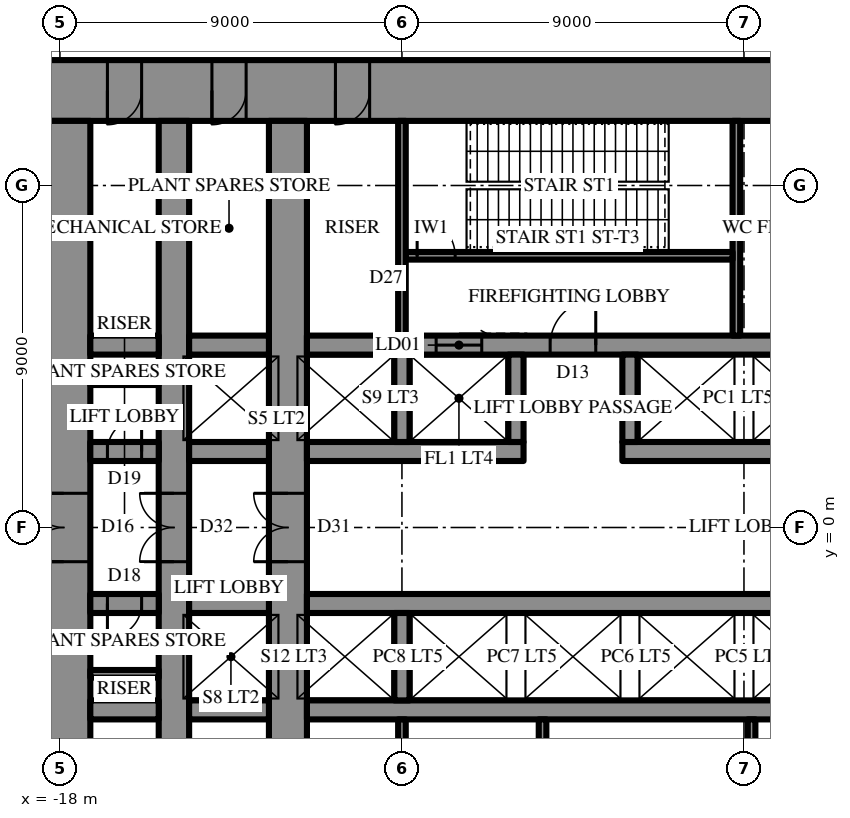
"""IFC4 building model, lengths in metres.
Left out: names, types, materials, properties, quantities, classifications, styles, units other than length and angle.
Written with IfcOpenShell. Run it as: python <this file> out.ifc"""

import sys

from ifc_helpers import new_model, si_unit, direction, frame, frame_2d, origin, place, context, subcontext, project, spatial, rectangle, extrude, element, fill, save


model = new_model("IFC4")
c1 = context("Model", 3, precision=1e-05, world=origin(), true_north=direction((0.0, 1.0)))
c2 = subcontext(c1, "Body", "Model", "MODEL_VIEW")
j1 = project(units=[si_unit("LENGTHUNIT", "METRE"), si_unit("PLANEANGLEUNIT", "RADIAN")], contexts=[c1])
p1 = place(None, origin())
s1 = spatial("IfcSite", under=j1, at=p1, CompositionType="ELEMENT")
p2 = place(p1, origin())
s2 = spatial("IfcBuilding", under=s1, at=p2, CompositionType="ELEMENT")
p3 = place(p2, frame((0.0, 0.0, 203.5)))
s3 = spatial("IfcBuildingStorey", under=s2, at=p3, CompositionType="ELEMENT", Elevation=203.5)
p4 = place(p3, frame((-18.6, 11.5, 0.0), z_axis=(0.0, 0.0, 1.0), x_axis=(1.0, 0.0, 0.0)))
e1 = element("IfcWall", 1, at=p4, inside=s3, PredefinedType="SHEAR", context=c2, shape_type="SweptSolid", body=[
    extrude(rectangle(XDim=37.2, YDim=1.6, at=frame_2d((18.6, 0.0))), origin(), (0.0, 0.0, 1.0), 7.0),
])
p5 = place(p4, frame((19.45, 0.0, 0.0)))
e2 = element("IfcOpeningElement", 2, at=p5, cuts=e1, PredefinedType="OPENING", context=c2, shape_type="SweptSolid", body=[
    extrude(rectangle(XDim=0.9, YDim=2.2, at=frame_2d((0.45, 1.1))), frame((0.0, 0.81, 0.0), z_axis=(0.0, -1.0, 0.0), x_axis=(1.0, 0.0, 0.0)), (0.0, 0.0, 1.0), 1.62),
])
p6 = place(p4, frame((22.45, 0.0, 0.0)))
e3 = element("IfcOpeningElement", 3, at=p6, cuts=e1, PredefinedType="OPENING", context=c2, shape_type="SweptSolid", body=[
    extrude(rectangle(XDim=0.9, YDim=2.2, at=frame_2d((0.45, 1.1))), frame((0.0, 0.81, 0.0), z_axis=(0.0, -1.0, 0.0), x_axis=(1.0, 0.0, 0.0)), (0.0, 0.0, 1.0), 1.62),
])
p7 = place(p4, frame((25.5, 0.0, 0.0)))
e4 = element("IfcOpeningElement", 4, at=p7, cuts=e1, PredefinedType="OPENING", context=c2, shape_type="SweptSolid", body=[
    extrude(rectangle(XDim=1.0, YDim=2.2, at=frame_2d((0.5, 1.1))), frame((0.0, 0.81, 0.0), z_axis=(0.0, -1.0, 0.0), x_axis=(1.0, 0.0, 0.0)), (0.0, 0.0, 1.0), 1.62),
])
p8 = place(p4, frame((1.85, 0.0, 0.0)))
e5 = element("IfcOpeningElement", 5, at=p8, cuts=e1, PredefinedType="OPENING", context=c2, shape_type="SweptSolid", body=[
    extrude(rectangle(XDim=0.9, YDim=2.2, at=frame_2d((0.45, 1.1))), frame((0.0, 0.81, 0.0), z_axis=(0.0, -1.0, 0.0), x_axis=(1.0, 0.0, 0.0)), (0.0, 0.0, 1.0), 1.62),
])
p9 = place(p4, frame((4.6, 0.0, 0.0)))
e6 = element("IfcOpeningElement", 6, at=p9, cuts=e1, PredefinedType="OPENING", context=c2, shape_type="SweptSolid", body=[
    extrude(rectangle(XDim=0.9, YDim=2.2, at=frame_2d((0.45, 1.1))), frame((0.0, 0.81, 0.0), z_axis=(0.0, -1.0, 0.0), x_axis=(1.0, 0.0, 0.0)), (0.0, 0.0, 1.0), 1.62),
])
p10 = place(p4, frame((7.85, 0.0, 0.0)))
e7 = element("IfcOpeningElement", 7, at=p10, cuts=e1, PredefinedType="OPENING", context=c2, shape_type="SweptSolid", body=[
    extrude(rectangle(XDim=0.9, YDim=2.2, at=frame_2d((0.45, 1.1))), frame((0.0, 0.81, 0.0), z_axis=(0.0, -1.0, 0.0), x_axis=(1.0, 0.0, 0.0)), (0.0, 0.0, 1.0), 1.62),
])
p11 = place(p4, frame((28.45, 0.0, 0.0)))
e8 = element("IfcOpeningElement", 8, at=p11, cuts=e1, PredefinedType="OPENING", context=c2, shape_type="SweptSolid", body=[
    extrude(rectangle(XDim=0.9, YDim=2.2, at=frame_2d((0.45, 1.1))), frame((0.0, 0.81, 0.0), z_axis=(0.0, -1.0, 0.0), x_axis=(1.0, 0.0, 0.0)), (0.0, 0.0, 1.0), 1.62),
])
p12 = place(p4, frame((31.7, 0.0, 0.0)))
e9 = element("IfcOpeningElement", 9, at=p12, cuts=e1, PredefinedType="OPENING", context=c2, shape_type="SweptSolid", body=[
    extrude(rectangle(XDim=0.9, YDim=2.2, at=frame_2d((0.45, 1.1))), frame((0.0, 0.81, 0.0), z_axis=(0.0, -1.0, 0.0), x_axis=(1.0, 0.0, 0.0)), (0.0, 0.0, 1.0), 1.62),
])
p13 = place(p4, frame((34.45, 0.0, 0.0)))
e10 = element("IfcOpeningElement", 10, at=p13, cuts=e1, PredefinedType="OPENING", context=c2, shape_type="SweptSolid", body=[
    extrude(rectangle(XDim=0.9, YDim=2.2, at=frame_2d((0.45, 1.1))), frame((0.0, 0.81, 0.0), z_axis=(0.0, -1.0, 0.0), x_axis=(1.0, 0.0, 0.0)), (0.0, 0.0, 1.0), 1.62),
])
p14 = place(p3, frame((-17.9, 10.7, 0.0), z_axis=(0.0, 0.0, 1.0), x_axis=(0.0, -1.0, 0.0)))
e11 = element("IfcWall", 11, at=p14, inside=s3, PredefinedType="SHEAR", context=c2, shape_type="SweptSolid", body=[
    extrude(rectangle(XDim=21.4, YDim=1.4, at=frame_2d((10.7, 0.0))), origin(), (0.0, 0.0, 1.0), 7.0),
])
p15 = place(p14, frame((9.8, 0.0, 0.0)))
e12 = element("IfcOpeningElement", 12, at=p15, cuts=e11, PredefinedType="OPENING", context=c2, shape_type="SweptSolid", body=[
    extrude(rectangle(XDim=1.8, YDim=2.4, at=frame_2d((0.9, 1.2))), frame((0.0, 0.71, 0.0), z_axis=(0.0, -1.0, 0.0), x_axis=(1.0, 0.0, 0.0)), (0.0, 0.0, 1.0), 1.42),
])
p16 = place(p3, frame((-12.0, -10.7, 0.0), z_axis=(0.0, 0.0, 1.0), x_axis=(0.0, 1.0, 0.0)))
e13 = element("IfcWall", 13, at=p16, inside=s3, PredefinedType="SHEAR", context=c2, shape_type="SweptSolid", body=[
    extrude(rectangle(XDim=21.4, YDim=1.0, at=frame_2d((10.7, 0.0))), origin(), (0.0, 0.0, 1.0), 7.0),
])
p17 = place(p16, frame((9.8, 0.0, 0.0)))
e14 = element("IfcOpeningElement", 14, at=p17, cuts=e13, PredefinedType="OPENING", context=c2, shape_type="SweptSolid", body=[
    extrude(rectangle(XDim=1.8, YDim=2.4, at=frame_2d((0.9, 1.2))), frame((0.0, 0.51, 0.0), z_axis=(0.0, -1.0, 0.0), x_axis=(1.0, 0.0, 0.0)), (0.0, 0.0, 1.0), 1.02),
])
p18 = place(p3, frame((-15.0, -10.7, 0.0), z_axis=(0.0, 0.0, 1.0), x_axis=(0.0, 1.0, 0.0)))
e15 = element("IfcWall", 15, at=p18, inside=s3, PredefinedType="SHEAR", context=c2, shape_type="SweptSolid", body=[
    extrude(rectangle(XDim=21.4, YDim=0.8, at=frame_2d((10.7, 0.0))), origin(), (0.0, 0.0, 1.0), 7.0),
])
p19 = place(p18, frame((9.8, 0.0, 0.0)))
e16 = element("IfcOpeningElement", 16, at=p19, cuts=e15, PredefinedType="OPENING", context=c2, shape_type="SweptSolid", body=[
    extrude(rectangle(XDim=1.8, YDim=2.4, at=frame_2d((0.9, 1.2))), frame((0.0, 0.41, 0.0), z_axis=(0.0, -1.0, 0.0), x_axis=(1.0, 0.0, 0.0)), (0.0, 0.0, 1.0), 0.82),
])
p20 = place(p3, frame((-17.2, 2.0, 0.0), z_axis=(0.0, 0.0, 1.0), x_axis=(1.0, 0.0, 0.0)))
e17 = element("IfcWall", 17, at=p20, inside=s3, PredefinedType="SHEAR", context=c2, shape_type="SweptSolid", body=[
    extrude(rectangle(XDim=1.8, YDim=0.5, at=frame_2d((0.9, 0.0))), origin(), (0.0, 0.0, 1.0), 7.0),
])
p21 = place(p20, frame((0.45, 0.0, 0.0)))
e18 = element("IfcOpeningElement", 18, at=p21, cuts=e17, PredefinedType="OPENING", context=c2, shape_type="SweptSolid", body=[
    extrude(rectangle(XDim=0.9, YDim=2.2, at=frame_2d((0.45, 1.1))), frame((0.0, 0.26, 0.0), z_axis=(0.0, -1.0, 0.0), x_axis=(1.0, 0.0, 0.0)), (0.0, 0.0, 1.0), 0.52),
])
p22 = place(p3, frame((-14.6, 2.0, 0.0), z_axis=(0.0, 0.0, 1.0), x_axis=(1.0, 0.0, 0.0)))
e19 = element("IfcWall", 19, at=p22, inside=s3, PredefinedType="SHEAR", context=c2, shape_type="SweptSolid", body=[
    extrude(rectangle(XDim=2.1, YDim=0.5, at=frame_2d((1.05, 0.0))), origin(), (0.0, 0.0, 1.0), 7.0),
])
p23 = place(p3, frame((-11.5, 2.0, 0.0), z_axis=(0.0, 0.0, 1.0), x_axis=(1.0, 0.0, 0.0)))
e20 = element("IfcWall", 20, at=p23, inside=s3, PredefinedType="SHEAR", context=c2, shape_type="SweptSolid", body=[
    extrude(rectangle(XDim=5.7, YDim=0.5, at=frame_2d((2.85, 0.0))), origin(), (0.0, 0.0, 1.0), 7.0),
])
p24 = place(p3, frame((-3.2, 2.0, 0.0), z_axis=(0.0, 0.0, 1.0), x_axis=(1.0, 0.0, 0.0)))
e21 = element("IfcWall", 21, at=p24, inside=s3, PredefinedType="SHEAR", context=c2, shape_type="SweptSolid", body=[
    extrude(rectangle(XDim=14.7, YDim=0.5, at=frame_2d((7.35, 0.0))), origin(), (0.0, 0.0, 1.0), 7.0),
])
p25 = place(p3, frame((-17.2, 4.8, 0.0), z_axis=(0.0, 0.0, 1.0), x_axis=(1.0, 0.0, 0.0)))
e22 = element("IfcWall", 22, at=p25, inside=s3, PredefinedType="SHEAR", context=c2, shape_type="SweptSolid", body=[
    extrude(rectangle(XDim=1.8, YDim=0.5, at=frame_2d((0.9, 0.0))), origin(), (0.0, 0.0, 1.0), 7.0),
])
p26 = place(p3, frame((-14.6, 4.8, 0.0), z_axis=(0.0, 0.0, 1.0), x_axis=(1.0, 0.0, 0.0)))
e23 = element("IfcWall", 23, at=p26, inside=s3, PredefinedType="SHEAR", context=c2, shape_type="SweptSolid", body=[
    extrude(rectangle(XDim=2.1, YDim=0.5, at=frame_2d((1.05, 0.0))), origin(), (0.0, 0.0, 1.0), 7.0),
])
p27 = place(p3, frame((-11.5, 4.8, 0.0), z_axis=(0.0, 0.0, 1.0), x_axis=(1.0, 0.0, 0.0)))
e24 = element("IfcWall", 24, at=p27, inside=s3, PredefinedType="SHEAR", context=c2, shape_type="SweptSolid", body=[
    extrude(rectangle(XDim=23.0, YDim=0.5, at=frame_2d((11.5, 0.0))), origin(), (0.0, 0.0, 1.0), 7.0),
])
p28 = place(p27, frame((6.4, 0.0, 0.0)))
e25 = element("IfcOpeningElement", 25, at=p28, cuts=e24, PredefinedType="OPENING", context=c2, shape_type="SweptSolid", body=[
    extrude(rectangle(XDim=1.2, YDim=2.2, at=frame_2d((0.6, 1.1))), frame((0.0, 0.26, 0.0), z_axis=(0.0, -1.0, 0.0), x_axis=(1.0, 0.0, 0.0)), (0.0, 0.0, 1.0), 0.52),
])
p29 = place(p27, frame((3.4, 0.0, 0.0)))
e26 = element("IfcOpeningElement", 26, at=p29, cuts=e24, PredefinedType="OPENING", context=c2, shape_type="SweptSolid", body=[
    extrude(rectangle(XDim=1.2, YDim=2.2, at=frame_2d((0.6, 1.1))), frame((0.0, 0.26, 0.0), z_axis=(0.0, -1.0, 0.0), x_axis=(1.0, 0.0, 0.0)), (0.0, 0.0, 1.0), 0.52),
])
for number, where, z_axis, x_axis in (
    (27, (-9.0, 2.25, 0.0), (0.0, 0.0, 1.0), (0.0, 1.0, 0.0)),
    (28, (-6.0, 2.25, 0.0), (0.0, 0.0, 1.0), (0.0, 1.0, 0.0)),
    (29, (-3.0, 2.25, 0.0), (0.0, 0.0, 1.0), (0.0, 1.0, 0.0)),
):
    element("IfcWall", number, at=place(p3, frame(where, z_axis=z_axis, x_axis=x_axis)), inside=s3, PredefinedType="SHEAR", context=c2, shape_type="SweptSolid", body=[
        extrude(rectangle(XDim=2.3, YDim=0.4, at=frame_2d((1.15, 0.0))), origin(), (0.0, 0.0, 1.0), 7.0),
    ])
p30 = place(p3, frame((-0.2, 5.05, 0.0), z_axis=(0.0, 0.0, 1.0), x_axis=(0.0, 1.0, 0.0)))
e30 = element("IfcWall", 30, at=p30, inside=s3, PredefinedType="SHEAR", context=c2, shape_type="SweptSolid", body=[
    extrude(rectangle(XDim=5.65, YDim=0.2, at=frame_2d((2.825, 0.0))), origin(), (0.0, 0.0, 1.0), 7.0),
])
p31 = place(p3, frame((-8.9, 7.15, 0.0), z_axis=(0.0, 0.0, 1.0), x_axis=(1.0, 0.0, 0.0)))
e31 = element("IfcWall", 31, at=p31, inside=s3, PredefinedType="SHEAR", context=c2, shape_type="SweptSolid", body=[
    extrude(rectangle(XDim=8.6, YDim=0.2, at=frame_2d((4.3, 0.0))), origin(), (0.0, 0.0, 1.0), 7.0),
])
p32 = place(p31, frame((0.3, 0.0, 0.0)))
e32 = element("IfcOpeningElement", 32, at=p32, cuts=e31, PredefinedType="OPENING", context=c2, shape_type="SweptSolid", body=[
    extrude(rectangle(XDim=1.0, YDim=2.2, at=frame_2d((0.5, 1.1))), frame((0.0, 0.11, 0.0), z_axis=(0.0, -1.0, 0.0), x_axis=(1.0, 0.0, 0.0)), (0.0, 0.0, 1.0), 0.22),
])
p33 = place(p3, frame((3.2, -2.0, 0.0), z_axis=(0.0, 0.0, 1.0), x_axis=(-1.0, 0.0, 0.0)))
e33 = element("IfcWall", 33, at=p33, inside=s3, PredefinedType="SHEAR", context=c2, shape_type="SweptSolid", body=[
    extrude(rectangle(XDim=14.7, YDim=0.5, at=frame_2d((7.35, 0.0))), origin(), (0.0, 0.0, 1.0), 7.0),
])
p34 = place(p3, frame((-12.5, -2.0, 0.0), z_axis=(0.0, 0.0, 1.0), x_axis=(-1.0, 0.0, 0.0)))
e34 = element("IfcWall", 34, at=p34, inside=s3, PredefinedType="SHEAR", context=c2, shape_type="SweptSolid", body=[
    extrude(rectangle(XDim=2.1, YDim=0.5, at=frame_2d((1.05, 0.0))), origin(), (0.0, 0.0, 1.0), 7.0),
])
p35 = place(p3, frame((-15.4, -2.0, 0.0), z_axis=(0.0, 0.0, 1.0), x_axis=(-1.0, 0.0, 0.0)))
e35 = element("IfcWall", 35, at=p35, inside=s3, PredefinedType="SHEAR", context=c2, shape_type="SweptSolid", body=[
    extrude(rectangle(XDim=1.8, YDim=0.5, at=frame_2d((0.9, 0.0))), origin(), (0.0, 0.0, 1.0), 7.0),
])
p36 = place(p35, frame((0.45, 0.0, 0.0)))
e36 = element("IfcOpeningElement", 36, at=p36, cuts=e35, PredefinedType="OPENING", context=c2, shape_type="SweptSolid", body=[
    extrude(rectangle(XDim=0.9, YDim=2.2, at=frame_2d((0.45, 1.1))), frame((0.0, 0.26, 0.0), z_axis=(0.0, -1.0, 0.0), x_axis=(1.0, 0.0, 0.0)), (0.0, 0.0, 1.0), 0.52),
])
p37 = place(p3, frame((11.5, -4.8, 0.0), z_axis=(0.0, 0.0, 1.0), x_axis=(-1.0, 0.0, 0.0)))
e37 = element("IfcWall", 37, at=p37, inside=s3, PredefinedType="SHEAR", context=c2, shape_type="SweptSolid", body=[
    extrude(rectangle(XDim=23.0, YDim=0.5, at=frame_2d((11.5, 0.0))), origin(), (0.0, 0.0, 1.0), 7.0),
])
p38 = place(p37, frame((6.4, 0.0, 0.0)))
e38 = element("IfcOpeningElement", 38, at=p38, cuts=e37, PredefinedType="OPENING", context=c2, shape_type="SweptSolid", body=[
    extrude(rectangle(XDim=1.2, YDim=2.2, at=frame_2d((0.6, 1.1))), frame((0.0, 0.26, 0.0), z_axis=(0.0, -1.0, 0.0), x_axis=(1.0, 0.0, 0.0)), (0.0, 0.0, 1.0), 0.52),
])
p39 = place(p37, frame((3.4, 0.0, 0.0)))
e39 = element("IfcOpeningElement", 39, at=p39, cuts=e37, PredefinedType="OPENING", context=c2, shape_type="SweptSolid", body=[
    extrude(rectangle(XDim=1.2, YDim=2.2, at=frame_2d((0.6, 1.1))), frame((0.0, 0.26, 0.0), z_axis=(0.0, -1.0, 0.0), x_axis=(1.0, 0.0, 0.0)), (0.0, 0.0, 1.0), 0.52),
])
p40 = place(p3, frame((-12.5, -4.8, 0.0), z_axis=(0.0, 0.0, 1.0), x_axis=(-1.0, 0.0, 0.0)))
e40 = element("IfcWall", 40, at=p40, inside=s3, PredefinedType="SHEAR", context=c2, shape_type="SweptSolid", body=[
    extrude(rectangle(XDim=2.1, YDim=0.5, at=frame_2d((1.05, 0.0))), origin(), (0.0, 0.0, 1.0), 7.0),
])
p41 = place(p3, frame((-15.4, -4.8, 0.0), z_axis=(0.0, 0.0, 1.0), x_axis=(-1.0, 0.0, 0.0)))
e41 = element("IfcWall", 41, at=p41, inside=s3, PredefinedType="SHEAR", context=c2, shape_type="SweptSolid", body=[
    extrude(rectangle(XDim=1.8, YDim=0.5, at=frame_2d((0.9, 0.0))), origin(), (0.0, 0.0, 1.0), 7.0),
])
p42 = place(p3, frame((-9.0, -2.25, 0.0), z_axis=(0.0, 0.0, 1.0), x_axis=(0.0, -1.0, 0.0)))
e42 = element("IfcWall", 42, at=p42, inside=s3, PredefinedType="SHEAR", context=c2, shape_type="SweptSolid", body=[
    extrude(rectangle(XDim=2.3, YDim=0.4, at=frame_2d((1.15, 0.0))), origin(), (0.0, 0.0, 1.0), 7.0),
])
p43 = place(p3, frame((0.2, -5.05, 0.0), z_axis=(0.0, 0.0, 1.0), x_axis=(0.0, -1.0, 0.0)))
e43 = element("IfcWall", 43, at=p43, inside=s3, PredefinedType="SHEAR", context=c2, shape_type="SweptSolid", body=[
    extrude(rectangle(XDim=5.65, YDim=0.2, at=frame_2d((2.825, 0.0))), origin(), (0.0, 0.0, 1.0), 7.0),
])
for number, where, z_axis, x_axis in (
    (44, (-9.0, 5.05, 0.0), (0.0, 0.0, 1.0), (0.0, 1.0, 0.0)),
    (45, (-9.0, -5.05, 0.0), (0.0, 0.0, 1.0), (0.0, -1.0, 0.0)),
    (46, (-5.3, -5.05, 0.0), (0.0, 0.0, 1.0), (0.0, -1.0, 0.0)),
):
    element("IfcWall", number, at=place(p3, frame(where, z_axis=z_axis, x_axis=x_axis)), inside=s3, PredefinedType="PARTITIONING", context=c2, shape_type="SweptSolid", body=[
        extrude(rectangle(XDim=5.65, YDim=0.2, at=frame_2d((2.825, 0.0))), origin(), (0.0, 0.0, 1.0), 6.7),
    ])
for number, where, z_axis, x_axis in (
    (47, (-17.2, 3.85, 0.0), (0.0, 0.0, 1.0), (1.0, 0.0, 0.0)),
    (48, (-15.4, -3.85, 0.0), (0.0, 0.0, 1.0), (-1.0, 0.0, 0.0)),
):
    element("IfcWall", number, at=place(p3, frame(where, z_axis=z_axis, x_axis=x_axis)), inside=s3, PredefinedType="PARTITIONING", context=c2, shape_type="SweptSolid", body=[
        extrude(rectangle(XDim=1.8, YDim=0.2, at=frame_2d((0.9, 0.0))), origin(), (0.0, 0.0, 1.0), 6.7),
    ])
p44 = place(p15, frame((1.8, 0.0, 0.0), z_axis=(0.0, 0.0, 1.0), x_axis=(-1.0, 0.0, 0.0)))
e49 = element("IfcDoor", 49, at=p44, inside=s3, OperationType="DOUBLE_DOOR_SINGLE_SWING", PredefinedType="DOOR", context=c2, shape_type="SweptSolid", body=[
    extrude(rectangle(XDim=1.8, YDim=2.4, at=frame_2d((0.9, 1.2))), frame((0.0, 0.025, 0.0), z_axis=(0.0, -1.0, 0.0), x_axis=(1.0, 0.0, 0.0)), (0.0, 0.0, 1.0), 0.05),
])
fill(e12, e49)
p45 = place(p28, origin())
e50 = element("IfcDoor", 50, at=p45, inside=s3, OperationType="SINGLE_SWING_LEFT", PredefinedType="DOOR", context=c2, shape_type="SweptSolid", body=[
    extrude(rectangle(XDim=1.2, YDim=2.2, at=frame_2d((0.6, 1.1))), frame((0.0, 0.025, 0.0), z_axis=(0.0, -1.0, 0.0), x_axis=(1.0, 0.0, 0.0)), (0.0, 0.0, 1.0), 0.05),
])
fill(e25, e50)
p46 = place(p32, origin())
e51 = element("IfcDoor", 51, at=p46, inside=s3, OperationType="SINGLE_SWING_RIGHT", PredefinedType="DOOR", context=c2, shape_type="SweptSolid", body=[
    extrude(rectangle(XDim=1.0, YDim=2.2, at=frame_2d((0.5, 1.1))), frame((0.0, 0.025, 0.0), z_axis=(0.0, -1.0, 0.0), x_axis=(1.0, 0.0, 0.0)), (0.0, 0.0, 1.0), 0.05),
])
fill(e32, e51)
p47 = place(p8, frame((0.9, 0.0, 0.0), z_axis=(0.0, 0.0, 1.0), x_axis=(-1.0, 0.0, 0.0)))
e52 = element("IfcDoor", 52, at=p47, inside=s3, OperationType="SINGLE_SWING_LEFT", PredefinedType="DOOR", context=c2, shape_type="SweptSolid", body=[
    extrude(rectangle(XDim=0.9, YDim=2.2, at=frame_2d((0.45, 1.1))), frame((0.0, 0.025, 0.0), z_axis=(0.0, -1.0, 0.0), x_axis=(1.0, 0.0, 0.0)), (0.0, 0.0, 1.0), 0.05),
])
fill(e5, e52)
p48 = place(p9, frame((0.9, 0.0, 0.0), z_axis=(0.0, 0.0, 1.0), x_axis=(-1.0, 0.0, 0.0)))
e53 = element("IfcDoor", 53, at=p48, inside=s3, OperationType="SINGLE_SWING_LEFT", PredefinedType="DOOR", context=c2, shape_type="SweptSolid", body=[
    extrude(rectangle(XDim=0.9, YDim=2.2, at=frame_2d((0.45, 1.1))), frame((0.0, 0.025, 0.0), z_axis=(0.0, -1.0, 0.0), x_axis=(1.0, 0.0, 0.0)), (0.0, 0.0, 1.0), 0.05),
])
fill(e6, e53)
p49 = place(p10, frame((0.9, 0.0, 0.0), z_axis=(0.0, 0.0, 1.0), x_axis=(-1.0, 0.0, 0.0)))
e54 = element("IfcDoor", 54, at=p49, inside=s3, OperationType="SINGLE_SWING_LEFT", PredefinedType="DOOR", context=c2, shape_type="SweptSolid", body=[
    extrude(rectangle(XDim=0.9, YDim=2.2, at=frame_2d((0.45, 1.1))), frame((0.0, 0.025, 0.0), z_axis=(0.0, -1.0, 0.0), x_axis=(1.0, 0.0, 0.0)), (0.0, 0.0, 1.0), 0.05),
])
fill(e7, e54)
p50 = place(p21, origin())
e55 = element("IfcDoor", 55, at=p50, inside=s3, OperationType="SINGLE_SWING_LEFT", PredefinedType="DOOR", context=c2, shape_type="SweptSolid", body=[
    extrude(rectangle(XDim=0.9, YDim=2.2, at=frame_2d((0.45, 1.1))), frame((0.0, 0.025, 0.0), z_axis=(0.0, -1.0, 0.0), x_axis=(1.0, 0.0, 0.0)), (0.0, 0.0, 1.0), 0.05),
])
fill(e18, e55)
p51 = place(p36, origin())
e56 = element("IfcDoor", 56, at=p51, inside=s3, OperationType="SINGLE_SWING_LEFT", PredefinedType="DOOR", context=c2, shape_type="SweptSolid", body=[
    extrude(rectangle(XDim=0.9, YDim=2.2, at=frame_2d((0.45, 1.1))), frame((0.0, 0.025, 0.0), z_axis=(0.0, -1.0, 0.0), x_axis=(1.0, 0.0, 0.0)), (0.0, 0.0, 1.0), 0.05),
])
fill(e36, e56)
p52 = place(p17, origin())
e57 = element("IfcDoor", 57, at=p52, inside=s3, OperationType="DOUBLE_DOOR_SINGLE_SWING", PredefinedType="DOOR", context=c2, shape_type="SweptSolid", body=[
    extrude(rectangle(XDim=1.8, YDim=2.4, at=frame_2d((0.9, 1.2))), frame((0.0, 0.025, 0.0), z_axis=(0.0, -1.0, 0.0), x_axis=(1.0, 0.0, 0.0)), (0.0, 0.0, 1.0), 0.05),
])
fill(e14, e57)
p53 = place(p19, origin())
e58 = element("IfcDoor", 58, at=p53, inside=s3, OperationType="DOUBLE_DOOR_SINGLE_SWING", PredefinedType="DOOR", context=c2, shape_type="SweptSolid", body=[
    extrude(rectangle(XDim=1.8, YDim=2.4, at=frame_2d((0.9, 1.2))), frame((0.0, 0.025, 0.0), z_axis=(0.0, -1.0, 0.0), x_axis=(1.0, 0.0, 0.0)), (0.0, 0.0, 1.0), 0.05),
])
fill(e16, e58)
p54 = place(p29, origin())
e59 = element("IfcDoor", 59, at=p54, inside=s3, OperationType="SLIDING_TO_LEFT", PredefinedType="DOOR", context=c2, shape_type="SweptSolid", body=[
    extrude(rectangle(XDim=1.2, YDim=2.2, at=frame_2d((0.6, 1.1))), frame((0.0, 0.025, 0.0), z_axis=(0.0, -1.0, 0.0), x_axis=(1.0, 0.0, 0.0)), (0.0, 0.0, 1.0), 0.05),
])
fill(e26, e59)
save(model, sys.argv[1])
